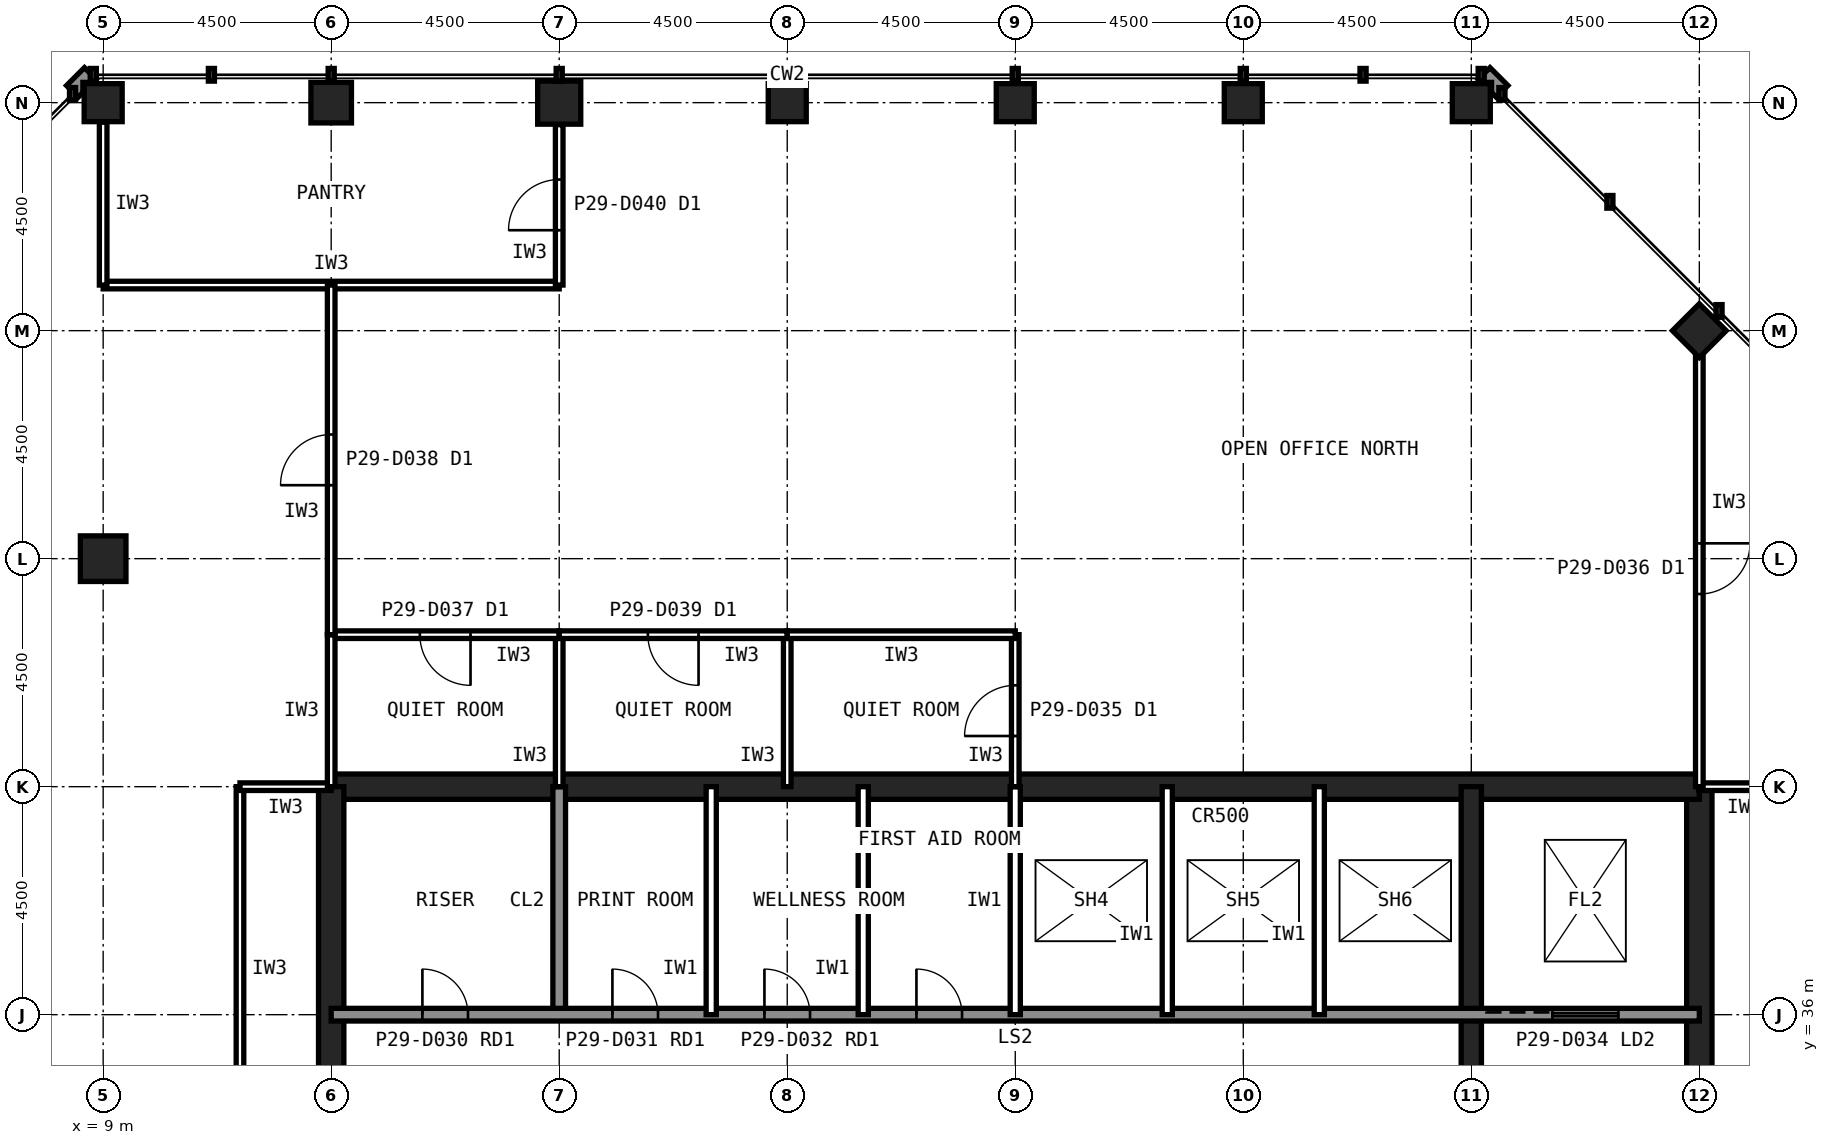
"""IFC4 building model, lengths in metres.
Left out: names, types, materials, properties, quantities, classifications, styles, units other than length and angle.
Written with IfcOpenShell. Run it as: python <this file> out.ifc"""

import sys

from ifc_helpers import new_model, si_unit, direction, frame, frame_2d, origin, origin_2d, place, context, subcontext, project, spatial, rectangle, hollow_rectangle, extrude, element, fill, save


model = new_model("IFC4")
c1 = context("Model", 3, precision=1e-05, world=origin(), true_north=direction((0.0, 1.0)))
c2 = subcontext(c1, "Body", "Model", "MODEL_VIEW")
j1 = project(units=[si_unit("LENGTHUNIT", "METRE"), si_unit("PLANEANGLEUNIT", "RADIAN")], contexts=[c1])
p1 = place(None, origin())
s1 = spatial("IfcSite", under=j1, at=p1, CompositionType="ELEMENT")
p2 = place(p1, origin())
s2 = spatial("IfcBuilding", under=s1, at=p2, CompositionType="ELEMENT")
p3 = place(p2, frame((0.0, 0.0, 127.6)))
s3 = spatial("IfcBuildingStorey", under=s2, at=p3, CompositionType="ELEMENT", Elevation=127.6)
for number, where, z_axis, x_axis in (
    (1, (36.0, 54.0, 0.0), (0.0, 0.0, 1.0), (1.0, 0.0, 0.0)),
    (2, (31.5, 54.0, 0.0), (0.0, 0.0, 1.0), (1.0, 0.0, 0.0)),
    (3, (27.0, 54.0, 0.0), (0.0, 0.0, 1.0), (1.0, 0.0, 0.0)),
    (4, (22.5, 54.0, 0.0), (0.0, 0.0, 1.0), (1.0, 0.0, 0.0)),
):
    element("IfcColumn", number, at=place(p3, frame(where, z_axis=z_axis, x_axis=x_axis)), inside=s3, PredefinedType="COLUMN", context=c2, shape_type="SweptSolid", body=[
        extrude(hollow_rectangle(XDim=0.75, YDim=0.75, WallThickness=0.04, at=origin_2d()), origin(), (0.0, 0.0, 1.0), 4.0),
    ])
p4 = place(p3, frame((18.0, 54.0, 0.0), z_axis=(0.0, 0.0, 1.0), x_axis=(1.0, 0.0, 0.0)))
e5 = element("IfcColumn", 5, at=p4, inside=s3, PredefinedType="COLUMN", context=c2, shape_type="SweptSolid", body=[
    extrude(hollow_rectangle(XDim=0.85, YDim=0.85, WallThickness=0.05, at=origin_2d()), origin(), (0.0, 0.0, 1.0), 4.0),
])
p5 = place(p3, frame((13.5, 54.0, 0.0), z_axis=(0.0, 0.0, 1.0), x_axis=(1.0, 0.0, 0.0)))
e6 = element("IfcColumn", 6, at=p5, inside=s3, PredefinedType="COLUMN", context=c2, shape_type="SweptSolid", body=[
    extrude(hollow_rectangle(XDim=0.8, YDim=0.8, WallThickness=0.045, at=origin_2d()), origin(), (0.0, 0.0, 1.0), 4.0),
])
for number, where, z_axis, x_axis in (
    (7, (9.0, 54.0, 0.0), (0.0, 0.0, 1.0), (1.0, 0.0, 0.0)),
    (8, (40.5, 49.5, 0.0), (0.0, 0.0, 1.0), (0.707, 0.707, 0.0)),
):
    element("IfcColumn", number, at=place(p3, frame(where, z_axis=z_axis, x_axis=x_axis)), inside=s3, PredefinedType="COLUMN", context=c2, shape_type="SweptSolid", body=[
        extrude(hollow_rectangle(XDim=0.75, YDim=0.75, WallThickness=0.04, at=origin_2d()), origin(), (0.0, 0.0, 1.0), 4.0),
    ])
p6 = place(p3, frame((9.0, 45.0, 0.0), z_axis=(0.0, 0.0, 1.0), x_axis=(1.0, 0.0, 0.0)))
e9 = element("IfcColumn", 9, at=p6, inside=s3, PredefinedType="COLUMN", context=c2, shape_type="SweptSolid", body=[
    extrude(hollow_rectangle(XDim=0.9, YDim=0.9, WallThickness=0.063, at=origin_2d()), origin(), (0.0, 0.0, 1.0), 4.0),
])
p7 = place(p3, frame((40.5, 13.5, 0.0), z_axis=(0.0, 0.0, 1.0), x_axis=(0.0, 1.0, 0.0)))
e10 = element("IfcWall", 10, at=p7, inside=s3, PredefinedType="SHEAR", context=c2, shape_type="SweptSolid", body=[
    extrude(rectangle(XDim=27.0, YDim=0.5, at=frame_2d((13.5, 0.0))), origin(), (0.0, 0.0, 1.0), 4.0),
])
p8 = place(p7, frame((5.85, 0.0, 0.0)))
e11 = element("IfcOpeningElement", 11, at=p8, cuts=e10, PredefinedType="OPENING", context=c2, shape_type="SweptSolid", body=[
    extrude(rectangle(XDim=1.8, YDim=2.1, at=frame_2d((0.9, 1.05))), frame((0.0, 0.26, 0.0), z_axis=(0.0, -1.0, 0.0), x_axis=(1.0, 0.0, 0.0)), (0.0, 0.0, 1.0), 0.52),
])
p9 = place(p7, frame((19.65, 0.0, 0.0)))
e12 = element("IfcOpeningElement", 12, at=p9, cuts=e10, PredefinedType="OPENING", context=c2, shape_type="SweptSolid", body=[
    extrude(rectangle(XDim=1.2, YDim=2.1, at=frame_2d((0.6, 1.05))), frame((0.0, 0.26, 0.0), z_axis=(0.0, -1.0, 0.0), x_axis=(1.0, 0.0, 0.0)), (0.0, 0.0, 1.0), 0.52),
])
p10 = place(p3, frame((40.5, 40.5, 0.0), z_axis=(0.0, 0.0, 1.0), x_axis=(-1.0, 0.0, 0.0)))
e13 = element("IfcWall", 13, at=p10, inside=s3, PredefinedType="SHEAR", context=c2, shape_type="SweptSolid", body=[
    extrude(rectangle(XDim=27.0, YDim=0.5, at=frame_2d((13.5, 0.0))), origin(), (0.0, 0.0, 1.0), 4.0),
])
p11 = place(p3, frame((13.5, 40.5, 0.0), z_axis=(0.0, 0.0, 1.0), x_axis=(0.0, -1.0, 0.0)))
e14 = element("IfcWall", 14, at=p11, inside=s3, PredefinedType="SHEAR", context=c2, shape_type="SweptSolid", body=[
    extrude(rectangle(XDim=27.0, YDim=0.5, at=frame_2d((13.5, 0.0))), origin(), (0.0, 0.0, 1.0), 4.0),
])
p12 = place(p11, frame((19.65, 0.0, 0.0)))
e15 = element("IfcOpeningElement", 15, at=p12, cuts=e14, PredefinedType="OPENING", context=c2, shape_type="SweptSolid", body=[
    extrude(rectangle(XDim=1.2, YDim=2.1, at=frame_2d((0.6, 1.05))), frame((0.0, 0.26, 0.0), z_axis=(0.0, -1.0, 0.0), x_axis=(1.0, 0.0, 0.0)), (0.0, 0.0, 1.0), 0.52),
])
p13 = place(p11, frame((5.85, 0.0, 0.0)))
e16 = element("IfcOpeningElement", 16, at=p13, cuts=e14, PredefinedType="OPENING", context=c2, shape_type="SweptSolid", body=[
    extrude(rectangle(XDim=1.8, YDim=2.1, at=frame_2d((0.9, 1.05))), frame((0.0, 0.26, 0.0), z_axis=(0.0, -1.0, 0.0), x_axis=(1.0, 0.0, 0.0)), (0.0, 0.0, 1.0), 0.52),
])
p14 = place(p3, frame((18.0, 36.0, 0.0), z_axis=(0.0, 0.0, 1.0), x_axis=(0.0, 1.0, 0.0)))
e17 = element("IfcWall", 17, at=p14, inside=s3, PredefinedType="SOLIDWALL", context=c2, shape_type="SweptSolid", body=[
    extrude(rectangle(XDim=4.5, YDim=0.25, at=frame_2d((2.25, 0.0))), origin(), (0.0, 0.0, 1.0), 3.84),
])
p15 = place(p3, frame((36.0, 22.5, 0.0), z_axis=(0.0, 0.0, 1.0), x_axis=(0.0, 1.0, 0.0)))
e18 = element("IfcWall", 18, at=p15, inside=s3, PredefinedType="SHEAR", context=c2, shape_type="SweptSolid", body=[
    extrude(rectangle(XDim=18.0, YDim=0.4, at=frame_2d((9.0, 0.0))), origin(), (0.0, 0.0, 1.0), 4.0),
])
p16 = place(p3, frame((13.5, 36.0, 0.0), z_axis=(0.0, 0.0, 1.0), x_axis=(1.0, 0.0, 0.0)))
e19 = element("IfcWall", 19, at=p16, inside=s3, PredefinedType="SOLIDWALL", context=c2, shape_type="SweptSolid", body=[
    extrude(rectangle(XDim=27.0, YDim=0.25, at=frame_2d((13.5, 0.0))), origin(), (0.0, 0.0, 1.0), 3.84),
])
p17 = place(p16, frame((1.8, 0.0, 0.0)))
e20 = element("IfcOpeningElement", 20, at=p17, cuts=e19, PredefinedType="OPENING", context=c2, shape_type="SweptSolid", body=[
    extrude(rectangle(XDim=0.9, YDim=2.1, at=frame_2d((0.45, 1.05))), frame((0.0, 0.135, 0.0), z_axis=(0.0, -1.0, 0.0), x_axis=(1.0, 0.0, 0.0)), (0.0, 0.0, 1.0), 0.27),
])
p18 = place(p16, frame((5.55, 0.0, 0.0)))
e21 = element("IfcOpeningElement", 21, at=p18, cuts=e19, PredefinedType="OPENING", context=c2, shape_type="SweptSolid", body=[
    extrude(rectangle(XDim=0.9, YDim=2.1, at=frame_2d((0.45, 1.05))), frame((0.0, 0.135, 0.0), z_axis=(0.0, -1.0, 0.0), x_axis=(1.0, 0.0, 0.0)), (0.0, 0.0, 1.0), 0.27),
])
p19 = place(p16, frame((8.55, 0.0, 0.0)))
e22 = element("IfcOpeningElement", 22, at=p19, cuts=e19, PredefinedType="OPENING", context=c2, shape_type="SweptSolid", body=[
    extrude(rectangle(XDim=0.9, YDim=2.1, at=frame_2d((0.45, 1.05))), frame((0.0, 0.135, 0.0), z_axis=(0.0, -1.0, 0.0), x_axis=(1.0, 0.0, 0.0)), (0.0, 0.0, 1.0), 0.27),
])
p20 = place(p16, frame((11.55, 0.0, 0.0)))
e23 = element("IfcOpeningElement", 23, at=p20, cuts=e19, PredefinedType="OPENING", context=c2, shape_type="SweptSolid", body=[
    extrude(rectangle(XDim=0.9, YDim=2.1, at=frame_2d((0.45, 1.05))), frame((0.0, 0.135, 0.0), z_axis=(0.0, -1.0, 0.0), x_axis=(1.0, 0.0, 0.0)), (0.0, 0.0, 1.0), 0.27),
])
p21 = place(p16, frame((24.1, 0.0, 0.0)))
e24 = element("IfcOpeningElement", 24, at=p21, cuts=e19, PredefinedType="OPENING", context=c2, shape_type="SweptSolid", body=[
    extrude(rectangle(XDim=1.3, YDim=2.2, at=frame_2d((0.65, 1.1))), frame((0.0, 0.135, 0.0), z_axis=(0.0, -1.0, 0.0), x_axis=(1.0, 0.0, 0.0)), (0.0, 0.0, 1.0), 0.27),
])
for number, where, z_axis, x_axis in (
    (25, (21.0, 36.0, 0.0), (0.0, 0.0, 1.0), (0.0, 1.0, 0.0)),
    (26, (24.0, 36.0, 0.0), (0.0, 0.0, 1.0), (0.0, 1.0, 0.0)),
    (27, (27.0, 36.0, 0.0), (0.0, 0.0, 1.0), (0.0, 1.0, 0.0)),
    (28, (30.0, 36.0, 0.0), (0.0, 0.0, 1.0), (0.0, 1.0, 0.0)),
    (29, (33.0, 36.0, 0.0), (0.0, 0.0, 1.0), (0.0, 1.0, 0.0)),
):
    element("IfcWall", number, at=place(p3, frame(where, z_axis=z_axis, x_axis=x_axis)), inside=s3, PredefinedType="PARTITIONING", context=c2, shape_type="SweptSolid", body=[
        extrude(rectangle(XDim=4.5, YDim=0.2, at=frame_2d((2.25, 0.0))), origin(), (0.0, 0.0, 1.0), 3.84),
    ])
p22 = place(p3, frame((11.7, 40.5, 0.0), z_axis=(0.0, 0.0, 1.0), x_axis=(0.0, -1.0, 0.0)))
e30 = element("IfcWall", 30, at=p22, inside=s3, PredefinedType="PARTITIONING", context=c2, shape_type="SweptSolid", body=[
    extrude(rectangle(XDim=7.2, YDim=0.15, at=frame_2d((3.6, 0.0))), origin(), (0.0, 0.0, 1.0), 3.84),
])
p23 = place(p3, frame((42.3, 40.5, 0.0), z_axis=(0.0, 0.0, 1.0), x_axis=(-1.0, 0.0, 0.0)))
e31 = element("IfcWall", 31, at=p23, inside=s3, PredefinedType="PARTITIONING", context=c2, shape_type="SweptSolid", body=[
    extrude(rectangle(XDim=1.81, YDim=0.15, at=frame_2d((0.905, 0.0))), origin(), (0.0, 0.0, 1.0), 2.989),
])
p24 = place(p3, frame((13.5, 40.5, 0.0), z_axis=(0.0, 0.0, 1.0), x_axis=(-1.0, 0.0, 0.0)))
e32 = element("IfcWall", 32, at=p24, inside=s3, PredefinedType="PARTITIONING", context=c2, shape_type="SweptSolid", body=[
    extrude(rectangle(XDim=1.8, YDim=0.15, at=frame_2d((0.9, 0.0))), origin(), (0.0, 0.0, 1.0), 2.989),
])
p25 = place(p3, frame((9.0, 50.4, 0.0), z_axis=(0.0, 0.0, 1.0), x_axis=(1.0, 0.0, 0.0)))
e33 = element("IfcWall", 33, at=p25, inside=s3, PredefinedType="PARTITIONING", context=c2, shape_type="SweptSolid", body=[
    extrude(rectangle(XDim=9.0, YDim=0.15, at=frame_2d((4.5, 0.0))), origin(), (0.0, 0.0, 1.0), 3.84),
])
p26 = place(p3, frame((18.0, 50.4, 0.0), z_axis=(0.0, 0.0, 1.0), x_axis=(0.0, 1.0, 0.0)))
e34 = element("IfcWall", 34, at=p26, inside=s3, PredefinedType="PARTITIONING", context=c2, shape_type="SweptSolid", body=[
    extrude(rectangle(XDim=3.165, YDim=0.15, at=frame_2d((1.583, 0.0))), origin(), (0.0, 0.0, 1.0), 2.989),
])
p27 = place(p26, frame((1.083, 0.0, 0.0)))
e35 = element("IfcOpeningElement", 35, at=p27, cuts=e34, PredefinedType="OPENING", context=c2, shape_type="SweptSolid", body=[
    extrude(rectangle(XDim=1.0, YDim=2.1, at=frame_2d((0.5, 1.05))), frame((0.0, 0.085, 0.0), z_axis=(0.0, -1.0, 0.0), x_axis=(1.0, 0.0, 0.0)), (0.0, 0.0, 1.0), 0.17),
])
p28 = place(p3, frame((9.0, 53.615, 0.0), z_axis=(0.0, 0.0, 1.0), x_axis=(0.0, -1.0, 0.0)))
e36 = element("IfcWall", 36, at=p28, inside=s3, PredefinedType="PARTITIONING", context=c2, shape_type="SweptSolid", body=[
    extrude(rectangle(XDim=3.215, YDim=0.15, at=frame_2d((1.607, 0.0))), origin(), (0.0, 0.0, 1.0), 3.229),
])
p29 = place(p3, frame((18.0, 40.5, 0.0), z_axis=(0.0, 0.0, 1.0), x_axis=(0.0, 1.0, 0.0)))
e37 = element("IfcWall", 37, at=p29, inside=s3, PredefinedType="PARTITIONING", context=c2, shape_type="SweptSolid", body=[
    extrude(rectangle(XDim=3.0, YDim=0.15, at=frame_2d((1.5, 0.0))), origin(), (0.0, 0.0, 1.0), 2.989),
])
p30 = place(p3, frame((18.0, 43.5, 0.0), z_axis=(0.0, 0.0, 1.0), x_axis=(-1.0, 0.0, 0.0)))
e38 = element("IfcWall", 38, at=p30, inside=s3, PredefinedType="PARTITIONING", context=c2, shape_type="SweptSolid", body=[
    extrude(rectangle(XDim=4.5, YDim=0.15, at=frame_2d((2.25, 0.0))), origin(), (0.0, 0.0, 1.0), 3.84),
])
p31 = place(p30, frame((1.75, 0.0, 0.0)))
e39 = element("IfcOpeningElement", 39, at=p31, cuts=e38, PredefinedType="OPENING", context=c2, shape_type="SweptSolid", body=[
    extrude(rectangle(XDim=1.0, YDim=2.1, at=frame_2d((0.5, 1.05))), frame((0.0, 0.085, 0.0), z_axis=(0.0, -1.0, 0.0), x_axis=(1.0, 0.0, 0.0)), (0.0, 0.0, 1.0), 0.17),
])
for number, where, z_axis, x_axis in (
    (40, (13.5, 43.5, 0.0), (0.0, 0.0, 1.0), (0.0, -1.0, 0.0)),
    (41, (22.5, 40.5, 0.0), (0.0, 0.0, 1.0), (0.0, 1.0, 0.0)),
):
    element("IfcWall", number, at=place(p3, frame(where, z_axis=z_axis, x_axis=x_axis)), inside=s3, PredefinedType="PARTITIONING", context=c2, shape_type="SweptSolid", body=[
        extrude(rectangle(XDim=3.0, YDim=0.15, at=frame_2d((1.5, 0.0))), origin(), (0.0, 0.0, 1.0), 2.989),
    ])
p32 = place(p3, frame((22.5, 43.5, 0.0), z_axis=(0.0, 0.0, 1.0), x_axis=(-1.0, 0.0, 0.0)))
e42 = element("IfcWall", 42, at=p32, inside=s3, PredefinedType="PARTITIONING", context=c2, shape_type="SweptSolid", body=[
    extrude(rectangle(XDim=4.5, YDim=0.15, at=frame_2d((2.25, 0.0))), origin(), (0.0, 0.0, 1.0), 3.84),
])
p33 = place(p32, frame((1.75, 0.0, 0.0)))
e43 = element("IfcOpeningElement", 43, at=p33, cuts=e42, PredefinedType="OPENING", context=c2, shape_type="SweptSolid", body=[
    extrude(rectangle(XDim=1.0, YDim=2.1, at=frame_2d((0.5, 1.05))), frame((0.0, 0.085, 0.0), z_axis=(0.0, -1.0, 0.0), x_axis=(1.0, 0.0, 0.0)), (0.0, 0.0, 1.0), 0.17),
])
p34 = place(p3, frame((27.0, 40.5, 0.0), z_axis=(0.0, 0.0, 1.0), x_axis=(0.0, 1.0, 0.0)))
e44 = element("IfcWall", 44, at=p34, inside=s3, PredefinedType="PARTITIONING", context=c2, shape_type="SweptSolid", body=[
    extrude(rectangle(XDim=3.0, YDim=0.15, at=frame_2d((1.5, 0.0))), origin(), (0.0, 0.0, 1.0), 2.989),
])
p35 = place(p34, frame((1.0, 0.0, 0.0)))
e45 = element("IfcOpeningElement", 45, at=p35, cuts=e44, PredefinedType="OPENING", context=c2, shape_type="SweptSolid", body=[
    extrude(rectangle(XDim=1.0, YDim=2.1, at=frame_2d((0.5, 1.05))), frame((0.0, 0.085, 0.0), z_axis=(0.0, -1.0, 0.0), x_axis=(1.0, 0.0, 0.0)), (0.0, 0.0, 1.0), 0.17),
])
p36 = place(p3, frame((27.0, 43.5, 0.0), z_axis=(0.0, 0.0, 1.0), x_axis=(-1.0, 0.0, 0.0)))
e46 = element("IfcWall", 46, at=p36, inside=s3, PredefinedType="PARTITIONING", context=c2, shape_type="SweptSolid", body=[
    extrude(rectangle(XDim=4.5, YDim=0.15, at=frame_2d((2.25, 0.0))), origin(), (0.0, 0.0, 1.0), 3.84),
])
p37 = place(p3, frame((40.5, 49.105, 0.0), z_axis=(0.0, 0.0, 1.0), x_axis=(0.0, -1.0, 0.0)))
e47 = element("IfcWall", 47, at=p37, inside=s3, PredefinedType="PARTITIONING", context=c2, shape_type="SweptSolid", body=[
    extrude(rectangle(XDim=8.605, YDim=0.15, at=frame_2d((4.302, 0.0))), origin(), (0.0, 0.0, 1.0), 2.989),
])
p38 = place(p37, frame((3.802, 0.0, 0.0)))
e48 = element("IfcOpeningElement", 48, at=p38, cuts=e47, PredefinedType="OPENING", context=c2, shape_type="SweptSolid", body=[
    extrude(rectangle(XDim=1.0, YDim=2.1, at=frame_2d((0.5, 1.05))), frame((0.0, 0.085, 0.0), z_axis=(0.0, -1.0, 0.0), x_axis=(1.0, 0.0, 0.0)), (0.0, 0.0, 1.0), 0.17),
])
p39 = place(p3, frame((13.5, 43.5, 0.0), z_axis=(0.0, 0.0, 1.0), x_axis=(0.0, 1.0, 0.0)))
e49 = element("IfcWall", 49, at=p39, inside=s3, PredefinedType="PARTITIONING", context=c2, shape_type="SweptSolid", body=[
    extrude(rectangle(XDim=6.9, YDim=0.15, at=frame_2d((3.45, 0.0))), origin(), (0.0, 0.0, 1.0), 2.989),
])
p40 = place(p39, frame((2.95, 0.0, 0.0)))
e50 = element("IfcOpeningElement", 50, at=p40, cuts=e49, PredefinedType="OPENING", context=c2, shape_type="SweptSolid", body=[
    extrude(rectangle(XDim=1.0, YDim=2.1, at=frame_2d((0.5, 1.05))), frame((0.0, 0.085, 0.0), z_axis=(0.0, -1.0, 0.0), x_axis=(1.0, 0.0, 0.0)), (0.0, 0.0, 1.0), 0.17),
])
p41 = place(p17, origin())
e51 = element("IfcDoor", 51, at=p41, inside=s3, OperationType="SINGLE_SWING_LEFT", PredefinedType="DOOR", context=c2, shape_type="SweptSolid", body=[
    extrude(rectangle(XDim=0.9, YDim=2.1, at=frame_2d((0.45, 1.05))), frame((0.0, 0.025, 0.0), z_axis=(0.0, -1.0, 0.0), x_axis=(1.0, 0.0, 0.0)), (0.0, 0.0, 1.0), 0.05),
])
fill(e20, e51)
p42 = place(p18, origin())
e52 = element("IfcDoor", 52, at=p42, inside=s3, OperationType="SINGLE_SWING_LEFT", PredefinedType="DOOR", context=c2, shape_type="SweptSolid", body=[
    extrude(rectangle(XDim=0.9, YDim=2.1, at=frame_2d((0.45, 1.05))), frame((0.0, 0.025, 0.0), z_axis=(0.0, -1.0, 0.0), x_axis=(1.0, 0.0, 0.0)), (0.0, 0.0, 1.0), 0.05),
])
fill(e21, e52)
p43 = place(p19, origin())
e53 = element("IfcDoor", 53, at=p43, inside=s3, OperationType="SINGLE_SWING_LEFT", PredefinedType="DOOR", context=c2, shape_type="SweptSolid", body=[
    extrude(rectangle(XDim=0.9, YDim=2.1, at=frame_2d((0.45, 1.05))), frame((0.0, 0.025, 0.0), z_axis=(0.0, -1.0, 0.0), x_axis=(1.0, 0.0, 0.0)), (0.0, 0.0, 1.0), 0.05),
])
fill(e22, e53)
p44 = place(p20, origin())
e54 = element("IfcDoor", 54, at=p44, inside=s3, OperationType="SINGLE_SWING_LEFT", PredefinedType="DOOR", context=c2, shape_type="SweptSolid", body=[
    extrude(rectangle(XDim=0.9, YDim=2.1, at=frame_2d((0.45, 1.05))), frame((0.0, 0.025, 0.0), z_axis=(0.0, -1.0, 0.0), x_axis=(1.0, 0.0, 0.0)), (0.0, 0.0, 1.0), 0.05),
])
fill(e23, e54)
p45 = place(p21, origin())
e55 = element("IfcDoor", 55, at=p45, inside=s3, OperationType="SLIDING_TO_LEFT", PredefinedType="DOOR", context=c2, shape_type="SweptSolid", body=[
    extrude(rectangle(XDim=1.3, YDim=2.2, at=frame_2d((0.65, 1.1))), frame((0.0, 0.025, 0.0), z_axis=(0.0, -1.0, 0.0), x_axis=(1.0, 0.0, 0.0)), (0.0, 0.0, 1.0), 0.05),
])
fill(e24, e55)
p46 = place(p27, origin())
e56 = element("IfcDoor", 56, at=p46, inside=s3, OperationType="SINGLE_SWING_LEFT", PredefinedType="DOOR", context=c2, shape_type="SweptSolid", body=[
    extrude(rectangle(XDim=1.0, YDim=2.1, at=frame_2d((0.5, 1.05))), frame((0.0, 0.025, 0.0), z_axis=(0.0, -1.0, 0.0), x_axis=(1.0, 0.0, 0.0)), (0.0, 0.0, 1.0), 0.05),
])
fill(e35, e56)
p47 = place(p31, origin())
e57 = element("IfcDoor", 57, at=p47, inside=s3, OperationType="SINGLE_SWING_LEFT", PredefinedType="DOOR", context=c2, shape_type="SweptSolid", body=[
    extrude(rectangle(XDim=1.0, YDim=2.1, at=frame_2d((0.5, 1.05))), frame((0.0, 0.025, 0.0), z_axis=(0.0, -1.0, 0.0), x_axis=(1.0, 0.0, 0.0)), (0.0, 0.0, 1.0), 0.05),
])
fill(e39, e57)
p48 = place(p33, origin())
e58 = element("IfcDoor", 58, at=p48, inside=s3, OperationType="SINGLE_SWING_LEFT", PredefinedType="DOOR", context=c2, shape_type="SweptSolid", body=[
    extrude(rectangle(XDim=1.0, YDim=2.1, at=frame_2d((0.5, 1.05))), frame((0.0, 0.025, 0.0), z_axis=(0.0, -1.0, 0.0), x_axis=(1.0, 0.0, 0.0)), (0.0, 0.0, 1.0), 0.05),
])
fill(e43, e58)
p49 = place(p35, origin())
e59 = element("IfcDoor", 59, at=p49, inside=s3, OperationType="SINGLE_SWING_LEFT", PredefinedType="DOOR", context=c2, shape_type="SweptSolid", body=[
    extrude(rectangle(XDim=1.0, YDim=2.1, at=frame_2d((0.5, 1.05))), frame((0.0, 0.025, 0.0), z_axis=(0.0, -1.0, 0.0), x_axis=(1.0, 0.0, 0.0)), (0.0, 0.0, 1.0), 0.05),
])
fill(e45, e59)
p50 = place(p38, origin())
e60 = element("IfcDoor", 60, at=p50, inside=s3, OperationType="SINGLE_SWING_LEFT", PredefinedType="DOOR", context=c2, shape_type="SweptSolid", body=[
    extrude(rectangle(XDim=1.0, YDim=2.1, at=frame_2d((0.5, 1.05))), frame((0.0, 0.025, 0.0), z_axis=(0.0, -1.0, 0.0), x_axis=(1.0, 0.0, 0.0)), (0.0, 0.0, 1.0), 0.05),
])
fill(e48, e60)
p51 = place(p40, origin())
e61 = element("IfcDoor", 61, at=p51, inside=s3, OperationType="SINGLE_SWING_LEFT", PredefinedType="DOOR", context=c2, shape_type="SweptSolid", body=[
    extrude(rectangle(XDim=1.0, YDim=2.1, at=frame_2d((0.5, 1.05))), frame((0.0, 0.025, 0.0), z_axis=(0.0, -1.0, 0.0), x_axis=(1.0, 0.0, 0.0)), (0.0, 0.0, 1.0), 0.05),
])
fill(e50, e61)
save(model, sys.argv[1])
